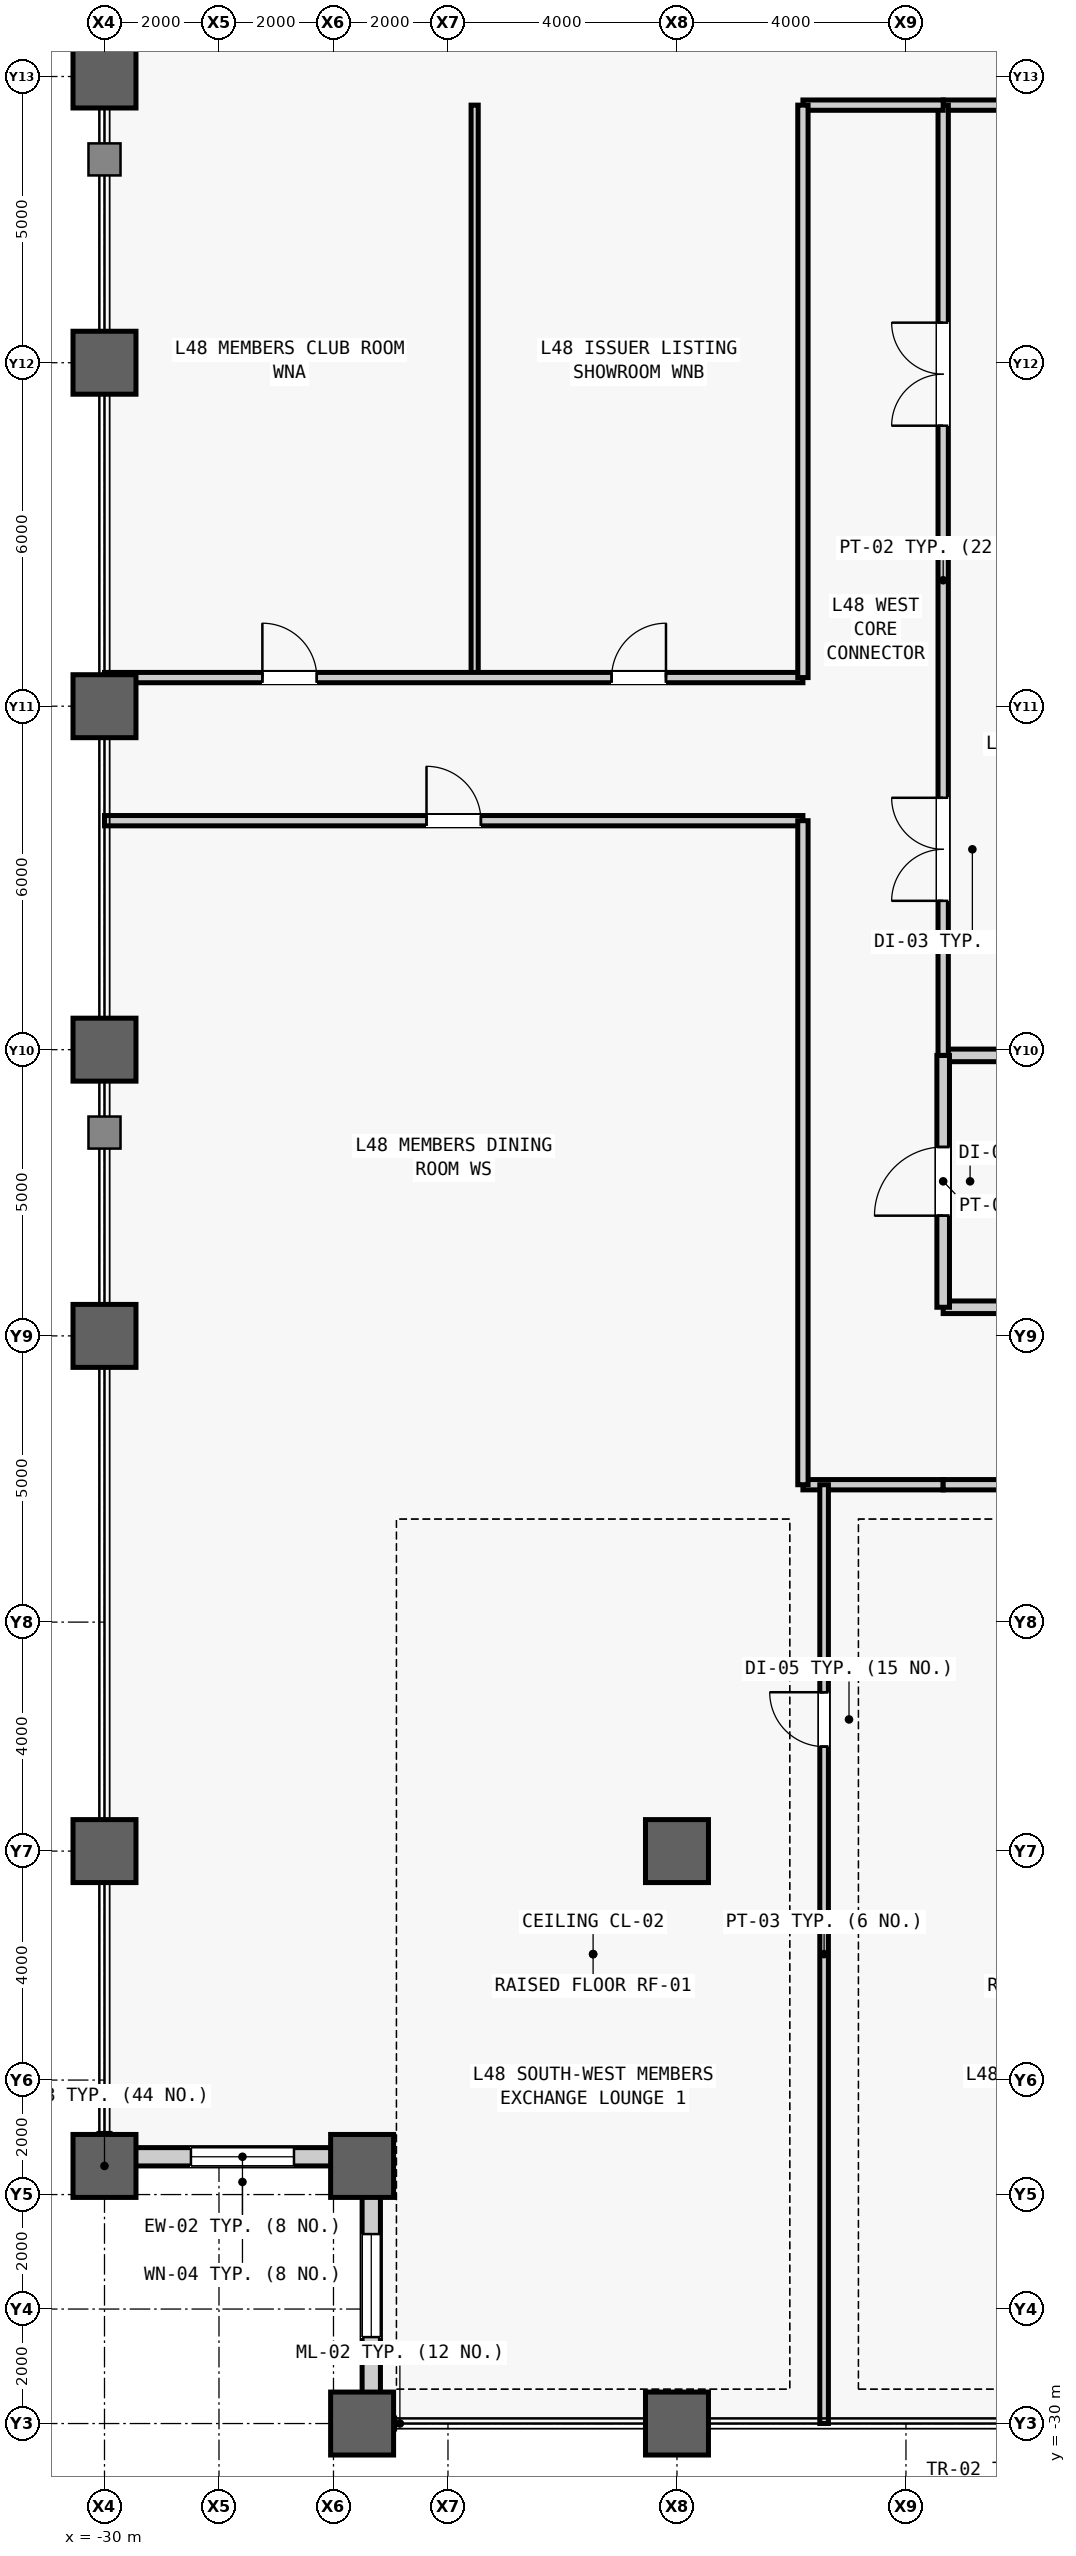
"""IFC4 building model, lengths in metres.
Left out: names, types, materials, properties, quantities, classifications, styles, units other than length and angle.
Written with IfcOpenShell. Run it as: python <this file> out.ifc"""

import sys

from ifc_helpers import new_model, si_unit, direction, frame, frame_2d, origin, origin_2d, place, context, subcontext, project, spatial, rectangle, hollow_rectangle, extrude, source, transform, mapped, element, fill, save


model = new_model("IFC4")
c1 = context("Model", 3, precision=1e-05, world=origin(), true_north=direction((0.0, 1.0)))
c2 = subcontext(c1, "Body", "Model", "MODEL_VIEW")
j1 = project(units=[si_unit("LENGTHUNIT", "METRE"), si_unit("PLANEANGLEUNIT", "RADIAN")], contexts=[c1])
p1 = place(None, origin())
s1 = spatial("IfcSite", under=j1, at=p1, CompositionType="ELEMENT")
p2 = place(p1, origin())
s2 = spatial("IfcBuilding", under=s1, at=p2, CompositionType="ELEMENT")
p3 = place(p2, frame((0.0, 0.0, 207.1)))
s3 = spatial("IfcBuildingStorey", under=s2, at=p3, CompositionType="ELEMENT", Elevation=207.1)
m1 = source(origin(), c2, "Body", "SweptSolid", [
    extrude(hollow_rectangle(XDim=1.1, YDim=1.1, WallThickness=0.06, at=origin_2d()), origin(), (0.0, 0.0, 1.0), 4.0),
])
for number, where, z_axis, x_axis in (
    (1, (-30.0, -25.5, 0.0), (0.0, 0.0, 1.0), (1.0, 0.0, 0.0)),
    (2, (-30.0, -20.0, 0.0), (0.0, 0.0, 1.0), (1.0, 0.0, 0.0)),
    (3, (-30.0, -11.0, 0.0), (0.0, 0.0, 1.0), (1.0, 0.0, 0.0)),
    (4, (-30.0, -6.0, 0.0), (0.0, 0.0, 1.0), (1.0, 0.0, 0.0)),
    (5, (-30.0, 0.0, 0.0), (0.0, 0.0, 1.0), (1.0, 0.0, 0.0)),
    (6, (-30.0, 6.0, 0.0), (0.0, 0.0, 1.0), (1.0, 0.0, 0.0)),
    (7, (-30.0, 11.0, 0.0), (0.0, 0.0, 1.0), (1.0, 0.0, 0.0)),
    (8, (-25.5, -30.0, 0.0), (0.0, 0.0, 1.0), (1.0, 0.0, 0.0)),
    (9, (-25.5, -25.5, 0.0), (0.0, 0.0, 1.0), (1.0, 0.0, 0.0)),
    (10, (-20.0, -30.0, 0.0), (0.0, 0.0, 1.0), (1.0, 0.0, 0.0)),
    (11, (-20.0, -20.0, 0.0), (0.0, 0.0, 1.0), (1.0, 0.0, 0.0)),
):
    element("IfcColumn", number, at=place(p3, frame(where, z_axis=z_axis, x_axis=x_axis)), inside=s3, PredefinedType="COLUMN", context=c2, shape_type="MappedRepresentation", body=[
        mapped(m1, transform((0.0, 0.0, 0.0), scale=1.0)),
    ])
m2 = source(origin(), c2, "Body", "SweptSolid", [
    extrude(rectangle(XDim=4.18, YDim=0.32, at=frame_2d((2.09, 0.0))), origin(), (0.0, 0.0, 1.0), 3.164),
])
p4 = place(p3, frame((-25.5, -25.34, 0.0), z_axis=(0.0, 0.0, 1.0), x_axis=(-1.0, 0.0, 0.0)))
e12 = element("IfcWall", 12, at=p4, inside=s3, PredefinedType="STANDARD", context=c2, shape_type="MappedRepresentation", body=[
    mapped(m2, transform((0.0, 0.0, 0.0), scale=1.0)),
])
m3 = source(origin(), c2, "Body", "SweptSolid", [
    extrude(rectangle(XDim=1.8, YDim=2.4, at=frame_2d((0.9, 1.2))), frame((0.0, 0.17, 0.0), z_axis=(0.0, -1.0, 0.0), x_axis=(1.0, 0.0, 0.0)), (0.0, 0.0, 1.0), 0.34),
])
p5 = place(p4, frame((1.19, 0.0, 0.5)))
e13 = element("IfcOpeningElement", 13, at=p5, cuts=e12, PredefinedType="OPENING", context=c2, shape_type="MappedRepresentation", body=[
    mapped(m3, transform((0.0, 0.0, 0.0), scale=1.0)),
])
m4 = source(origin(), c2, "Body", "SweptSolid", [
    extrude(rectangle(XDim=4.18, YDim=0.32, at=frame_2d((2.09, 0.0))), origin(), (0.0, 0.0, 1.0), 2.38),
])
p6 = place(p3, frame((-25.34, -29.68, 0.0), z_axis=(0.0, 0.0, 1.0), x_axis=(0.0, 1.0, 0.0)))
e14 = element("IfcWall", 14, at=p6, inside=s3, PredefinedType="STANDARD", context=c2, shape_type="MappedRepresentation", body=[
    mapped(m4, transform((0.0, 0.0, 0.0), scale=1.0)),
])
m5 = source(origin(), c2, "Body", "SweptSolid", [
    extrude(rectangle(XDim=1.8, YDim=1.66, at=frame_2d((0.9, 0.83))), frame((0.0, 0.17, 0.0), z_axis=(0.0, -1.0, 0.0), x_axis=(1.0, 0.0, 0.0)), (0.0, 0.0, 1.0), 0.34),
])
p7 = place(p6, frame((1.19, 0.0, 0.5)))
e15 = element("IfcOpeningElement", 15, at=p7, cuts=e14, PredefinedType="OPENING", context=c2, shape_type="MappedRepresentation", body=[
    mapped(m5, transform((0.0, 0.0, 0.0), scale=1.0)),
])
m6 = source(origin(), c2, "Body", "SweptSolid", [
    extrude(rectangle(XDim=4.05, YDim=0.22, at=frame_2d((2.025, 0.0))), origin(), (0.0, 0.0, 1.0), 3.78),
])
p8 = place(p3, frame((-15.35, -10.5, 0.0), z_axis=(0.0, 0.0, 1.0), x_axis=(1.0, 0.0, 0.0)))
e16 = element("IfcWall", 16, at=p8, inside=s3, PredefinedType="PARTITIONING", context=c2, shape_type="MappedRepresentation", body=[
    mapped(m6, transform((0.0, 0.0, 0.0), scale=1.0)),
])
m7 = source(origin(), c2, "Body", "SweptSolid", [
    extrude(rectangle(XDim=4.05, YDim=0.22, at=frame_2d((2.025, 0.0))), origin(), (0.0, 0.0, 1.0), 2.38),
])
p9 = place(p3, frame((-15.35, -6.1, 0.0), z_axis=(0.0, 0.0, 1.0), x_axis=(1.0, 0.0, 0.0)))
e17 = element("IfcWall", 17, at=p9, inside=s3, PredefinedType="PARTITIONING", context=c2, shape_type="MappedRepresentation", body=[
    mapped(m7, transform((0.0, 0.0, 0.0), scale=1.0)),
])
m8 = source(origin(), c2, "Body", "SweptSolid", [
    extrude(rectangle(XDim=4.4, YDim=0.22, at=frame_2d((2.2, 0.0))), origin(), (0.0, 0.0, 1.0), 3.78),
])
p10 = place(p3, frame((-15.35, -10.5, 0.0), z_axis=(0.0, 0.0, 1.0), x_axis=(0.0, 1.0, 0.0)))
e18 = element("IfcWall", 18, at=p10, inside=s3, PredefinedType="PARTITIONING", context=c2, shape_type="MappedRepresentation", body=[
    mapped(m8, transform((0.0, 0.0, 0.0), scale=1.0)),
])
m9 = source(origin(), c2, "Body", "SweptSolid", [
    extrude(rectangle(XDim=1.2, YDim=2.2, at=frame_2d((0.6, 1.1))), frame((0.0, 0.12, 0.0), z_axis=(0.0, -1.0, 0.0), x_axis=(1.0, 0.0, 0.0)), (0.0, 0.0, 1.0), 0.24),
])
p11 = place(p10, frame((1.6, 0.0, 0.0)))
e19 = element("IfcOpeningElement", 19, at=p11, cuts=e18, PredefinedType="OPENING", context=c2, shape_type="MappedRepresentation", body=[
    mapped(m9, transform((0.0, 0.0, 0.0), scale=1.0)),
])
m10 = source(origin(), c2, "Body", "SweptSolid", [
    extrude(rectangle(XDim=4.05, YDim=0.18, at=frame_2d((2.025, 0.0))), origin(), (0.0, 0.0, 1.0), 3.78),
])
p12 = place(p3, frame((-15.35, 10.5, 0.0), z_axis=(0.0, 0.0, 1.0), x_axis=(1.0, 0.0, 0.0)))
e20 = element("IfcWall", 20, at=p12, inside=s3, PredefinedType="PARTITIONING", context=c2, shape_type="MappedRepresentation", body=[
    mapped(m10, transform((0.0, 0.0, 0.0), scale=1.0)),
])
m11 = source(origin(), c2, "Body", "SweptSolid", [
    extrude(rectangle(XDim=16.6, YDim=0.18, at=frame_2d((8.3, 0.0))), origin(), (0.0, 0.0, 1.0), 3.78),
])
p13 = place(p3, frame((-15.35, -6.1, 0.0), z_axis=(0.0, 0.0, 1.0), x_axis=(0.0, 1.0, 0.0)))
e21 = element("IfcWall", 21, at=p13, inside=s3, PredefinedType="PARTITIONING", context=c2, shape_type="MappedRepresentation", body=[
    mapped(m11, transform((0.0, 0.0, 0.0), scale=1.0)),
])
m12 = source(origin(), c2, "Body", "SweptSolid", [
    extrude(rectangle(XDim=1.8, YDim=2.25, at=frame_2d((0.9, 1.125))), frame((0.0, 0.1, 0.0), z_axis=(0.0, -1.0, 0.0), x_axis=(1.0, 0.0, 0.0)), (0.0, 0.0, 1.0), 0.2),
])
p14 = place(p13, frame((2.7, 0.0, 0.0)))
e22 = element("IfcOpeningElement", 22, at=p14, cuts=e21, PredefinedType="OPENING", context=c2, shape_type="MappedRepresentation", body=[
    mapped(m12, transform((0.0, 0.0, 0.0), scale=1.0)),
])
p15 = place(p13, frame((11.0, 0.0, 0.0)))
e23 = element("IfcOpeningElement", 23, at=p15, cuts=e21, PredefinedType="OPENING", context=c2, shape_type="MappedRepresentation", body=[
    mapped(m12, transform((0.0, 0.0, 0.0), scale=1.0)),
])
m13 = source(origin(), c2, "Body", "SweptSolid", [
    extrude(rectangle(XDim=2.45, YDim=0.18, at=frame_2d((1.225, 0.0))), origin(), (0.0, 0.0, 1.0), 3.78),
])
for number, where, z_axis, x_axis in (
    (24, (-17.8, 10.5, 0.0), (0.0, 0.0, 1.0), (1.0, 0.0, 0.0)),
    (25, (-17.8, -13.6, 0.0), (0.0, 0.0, 1.0), (1.0, 0.0, 0.0)),
):
    element("IfcWall", number, at=place(p3, frame(where, z_axis=z_axis, x_axis=x_axis)), inside=s3, PredefinedType="PARTITIONING", context=c2, shape_type="MappedRepresentation", body=[
        mapped(m13, transform((0.0, 0.0, 0.0), scale=1.0)),
    ])
m14 = source(origin(), c2, "Body", "SweptSolid", [
    extrude(rectangle(XDim=16.4, YDim=0.15, at=frame_2d((8.2, 0.0))), origin(), (0.0, 0.0, 1.0), 3.78),
])
p16 = place(p3, frame((-17.43, -30.0, 0.0), z_axis=(0.0, 0.0, 1.0), x_axis=(0.0, 1.0, 0.0)))
e26 = element("IfcWall", 26, at=p16, inside=s3, PredefinedType="PARTITIONING", context=c2, shape_type="MappedRepresentation", body=[
    mapped(m14, transform((0.0, 0.0, 0.0), scale=1.0)),
])
m15 = source(origin(), c2, "Body", "SweptSolid", [
    extrude(rectangle(XDim=0.95, YDim=2.15, at=frame_2d((0.475, 1.075))), frame((0.0, 0.085, 0.0), z_axis=(0.0, -1.0, 0.0), x_axis=(1.0, 0.0, 0.0)), (0.0, 0.0, 1.0), 0.17),
])
p17 = place(p16, frame((11.825, 0.0, 0.0)))
e27 = element("IfcOpeningElement", 27, at=p17, cuts=e26, PredefinedType="OPENING", context=c2, shape_type="MappedRepresentation", body=[
    mapped(m15, transform((0.0, 0.0, 0.0), scale=1.0)),
])
m16 = source(origin(), c2, "Body", "SweptSolid", [
    extrude(rectangle(XDim=16.75, YDim=0.18, at=frame_2d((8.375, 0.0))), origin(), (0.0, 0.0, 1.0), 3.78),
])
p18 = place(p3, frame((-15.35, -13.6, 0.0), z_axis=(0.0, 0.0, 1.0), x_axis=(1.0, 0.0, 0.0)))
e28 = element("IfcWall", 28, at=p18, inside=s3, PredefinedType="PARTITIONING", context=c2, shape_type="MappedRepresentation", body=[
    mapped(m16, transform((0.0, 0.0, 0.0), scale=1.0)),
])
m17 = source(origin(), c2, "Body", "SweptSolid", [
    extrude(rectangle(XDim=12.2, YDim=0.18, at=frame_2d((6.1, 0.0))), origin(), (0.0, 0.0, 1.0), 3.78),
])
p19 = place(p3, frame((-30.0, -2.0, 0.0), z_axis=(0.0, 0.0, 1.0), x_axis=(1.0, 0.0, 0.0)))
e29 = element("IfcWall", 29, at=p19, inside=s3, PredefinedType="PARTITIONING", context=c2, shape_type="MappedRepresentation", body=[
    mapped(m17, transform((0.0, 0.0, 0.0), scale=1.0)),
])
m18 = source(origin(), c2, "Body", "SweptSolid", [
    extrude(rectangle(XDim=0.95, YDim=2.15, at=frame_2d((0.475, 1.075))), frame((0.0, 0.1, 0.0), z_axis=(0.0, -1.0, 0.0), x_axis=(1.0, 0.0, 0.0)), (0.0, 0.0, 1.0), 0.2),
])
p20 = place(p19, frame((5.625, 0.0, 0.0)))
e30 = element("IfcOpeningElement", 30, at=p20, cuts=e29, PredefinedType="OPENING", context=c2, shape_type="MappedRepresentation", body=[
    mapped(m18, transform((0.0, 0.0, 0.0), scale=1.0)),
])
m19 = source(origin(), c2, "Body", "SweptSolid", [
    extrude(rectangle(XDim=11.6, YDim=0.18, at=frame_2d((5.8, 0.0))), origin(), (0.0, 0.0, 1.0), 3.78),
])
p21 = place(p3, frame((-17.8, -13.6, 0.0), z_axis=(0.0, 0.0, 1.0), x_axis=(0.0, 1.0, 0.0)))
e31 = element("IfcWall", 31, at=p21, inside=s3, PredefinedType="PARTITIONING", context=c2, shape_type="MappedRepresentation", body=[
    mapped(m19, transform((0.0, 0.0, 0.0), scale=1.0)),
])
m20 = source(origin(), c2, "Body", "SweptSolid", [
    extrude(rectangle(XDim=10.0, YDim=0.125, at=frame_2d((5.0, 0.0))), origin(), (0.0, 0.0, 1.0), 3.78),
])
p22 = place(p3, frame((-23.534, 0.5, 0.0), z_axis=(0.0, 0.0, 1.0), x_axis=(0.0, 1.0, 0.0)))
e32 = element("IfcWall", 32, at=p22, inside=s3, PredefinedType="PARTITIONING", context=c2, shape_type="MappedRepresentation", body=[
    mapped(m20, transform((0.0, 0.0, 0.0), scale=1.0)),
])
p23 = place(p3, frame((-30.0, 0.5, 0.0), z_axis=(0.0, 0.0, 1.0), x_axis=(1.0, 0.0, 0.0)))
e33 = element("IfcWall", 33, at=p23, inside=s3, PredefinedType="PARTITIONING", context=c2, shape_type="MappedRepresentation", body=[
    mapped(m17, transform((0.0, 0.0, 0.0), scale=1.0)),
])
p24 = place(p23, frame((2.758, 0.0, 0.0)))
e34 = element("IfcOpeningElement", 34, at=p24, cuts=e33, PredefinedType="OPENING", context=c2, shape_type="MappedRepresentation", body=[
    mapped(m18, transform((0.0, 0.0, 0.0), scale=1.0)),
])
p25 = place(p23, frame((8.858, 0.0, 0.0)))
e35 = element("IfcOpeningElement", 35, at=p25, cuts=e33, PredefinedType="OPENING", context=c2, shape_type="MappedRepresentation", body=[
    mapped(m18, transform((0.0, 0.0, 0.0), scale=1.0)),
])
m21 = source(origin(), c2, "Body", "SweptSolid", [
    extrude(rectangle(XDim=10.0, YDim=0.18, at=frame_2d((5.0, 0.0))), origin(), (0.0, 0.0, 1.0), 3.78),
])
p26 = place(p3, frame((-17.8, 0.5, 0.0), z_axis=(0.0, 0.0, 1.0), x_axis=(0.0, 1.0, 0.0)))
e36 = element("IfcWall", 36, at=p26, inside=s3, PredefinedType="PARTITIONING", context=c2, shape_type="MappedRepresentation", body=[
    mapped(m21, transform((0.0, 0.0, 0.0), scale=1.0)),
])
m22 = source(origin(), c2, "Body", "SweptSolid", [
    extrude(rectangle(XDim=1.8, YDim=2.4, at=frame_2d((0.9, 1.2))), frame((0.0, 0.03, 0.0), z_axis=(0.0, -1.0, 0.0), x_axis=(1.0, 0.0, 0.0)), (0.0, 0.0, 1.0), 0.06),
])
p27 = place(p5, origin())
e37 = element("IfcWindow", 37, at=p27, inside=s3, PartitioningType="SINGLE_PANEL", PredefinedType="WINDOW", context=c2, shape_type="MappedRepresentation", body=[
    mapped(m22, transform((0.0, 0.0, 0.0), scale=1.0)),
])
fill(e13, e37)
m23 = source(origin(), c2, "Body", "SweptSolid", [
    extrude(rectangle(XDim=1.8, YDim=1.66, at=frame_2d((0.9, 0.83))), frame((0.0, 0.03, 0.0), z_axis=(0.0, -1.0, 0.0), x_axis=(1.0, 0.0, 0.0)), (0.0, 0.0, 1.0), 0.06),
])
p28 = place(p7, origin())
e38 = element("IfcWindow", 38, at=p28, inside=s3, PartitioningType="SINGLE_PANEL", PredefinedType="WINDOW", context=c2, shape_type="MappedRepresentation", body=[
    mapped(m23, transform((0.0, 0.0, 0.0), scale=1.0)),
])
fill(e15, e38)
m24 = source(origin(), c2, "Body", "SweptSolid", [
    extrude(rectangle(XDim=1.2, YDim=2.2, at=frame_2d((0.6, 1.1))), frame((0.0, 0.025, 0.0), z_axis=(0.0, -1.0, 0.0), x_axis=(1.0, 0.0, 0.0)), (0.0, 0.0, 1.0), 0.05),
])
p29 = place(p11, origin())
e39 = element("IfcDoor", 39, at=p29, inside=s3, OperationType="SINGLE_SWING_LEFT", PredefinedType="DOOR", context=c2, shape_type="MappedRepresentation", body=[
    mapped(m24, transform((0.0, 0.0, 0.0), scale=1.0)),
])
fill(e19, e39)
m25 = source(origin(), c2, "Body", "SweptSolid", [
    extrude(rectangle(XDim=1.8, YDim=2.25, at=frame_2d((0.9, 1.125))), frame((0.0, 0.025, 0.0), z_axis=(0.0, -1.0, 0.0), x_axis=(1.0, 0.0, 0.0)), (0.0, 0.0, 1.0), 0.05),
])
p30 = place(p14, origin())
e40 = element("IfcDoor", 40, at=p30, inside=s3, OperationType="SINGLE_SWING_LEFT", PredefinedType="DOOR", context=c2, shape_type="MappedRepresentation", body=[
    mapped(m25, transform((0.0, 0.0, 0.0), scale=1.0)),
])
fill(e22, e40)
p31 = place(p15, origin())
e41 = element("IfcDoor", 41, at=p31, inside=s3, OperationType="SINGLE_SWING_RIGHT", PredefinedType="DOOR", context=c2, shape_type="MappedRepresentation", body=[
    mapped(m25, transform((0.0, 0.0, 0.0), scale=1.0)),
])
fill(e23, e41)
m26 = source(origin(), c2, "Body", "SweptSolid", [
    extrude(rectangle(XDim=0.95, YDim=2.15, at=frame_2d((0.475, 1.075))), frame((0.0, 0.025, 0.0), z_axis=(0.0, -1.0, 0.0), x_axis=(1.0, 0.0, 0.0)), (0.0, 0.0, 1.0), 0.05),
])
p32 = place(p17, origin())
e42 = element("IfcDoor", 42, at=p32, inside=s3, OperationType="SINGLE_SWING_RIGHT", PredefinedType="DOOR", context=c2, shape_type="MappedRepresentation", body=[
    mapped(m26, transform((0.0, 0.0, 0.0), scale=1.0)),
])
fill(e27, e42)
p33 = place(p20, origin())
e43 = element("IfcDoor", 43, at=p33, inside=s3, OperationType="SINGLE_SWING_LEFT", PredefinedType="DOOR", context=c2, shape_type="MappedRepresentation", body=[
    mapped(m26, transform((0.0, 0.0, 0.0), scale=1.0)),
])
fill(e30, e43)
p34 = place(p24, origin())
e44 = element("IfcDoor", 44, at=p34, inside=s3, OperationType="SINGLE_SWING_LEFT", PredefinedType="DOOR", context=c2, shape_type="MappedRepresentation", body=[
    mapped(m26, transform((0.0, 0.0, 0.0), scale=1.0)),
])
fill(e34, e44)
p35 = place(p25, origin())
e45 = element("IfcDoor", 45, at=p35, inside=s3, OperationType="SINGLE_SWING_RIGHT", PredefinedType="DOOR", context=c2, shape_type="MappedRepresentation", body=[
    mapped(m26, transform((0.0, 0.0, 0.0), scale=1.0)),
])
fill(e35, e45)
save(model, sys.argv[1])
